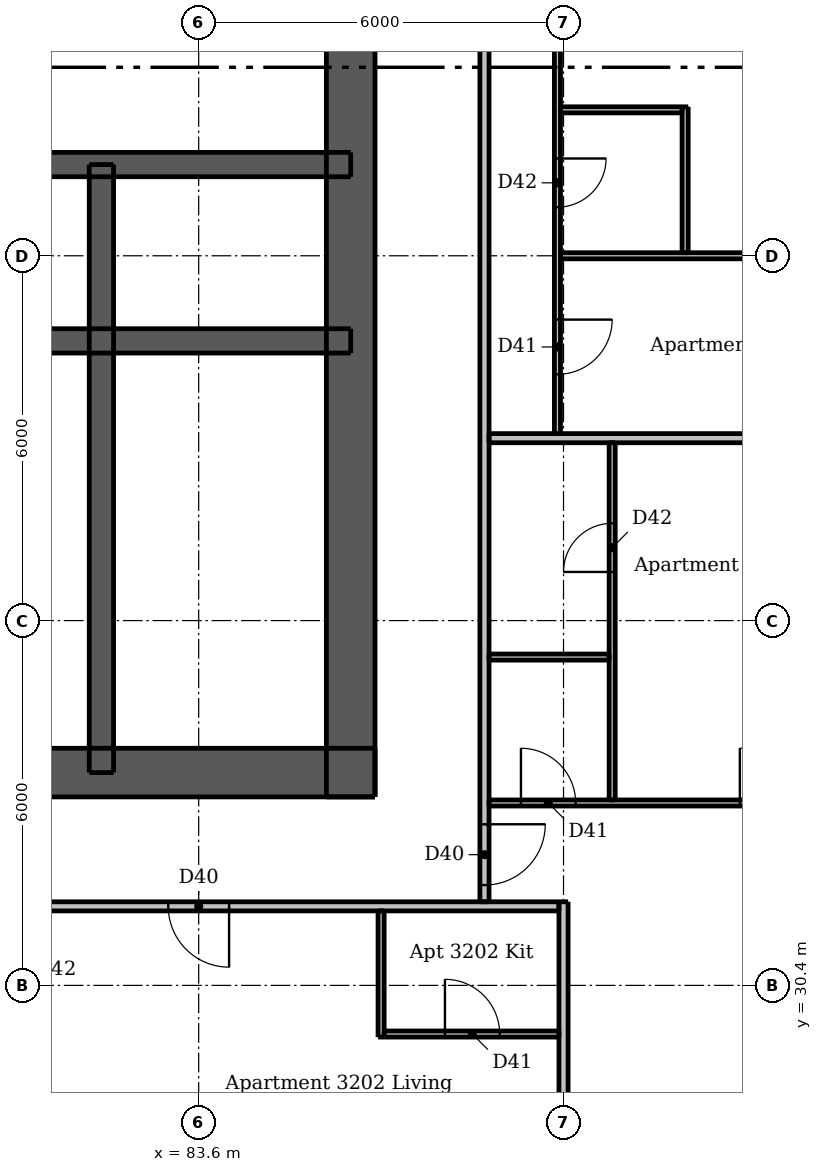
"""IFC4 building model, lengths in metres.
Left out: names, types, materials, properties, quantities, classifications, styles, units other than length and angle.
Written with IfcOpenShell. Run it as: python <this file> out.ifc"""

import sys

from ifc_helpers import new_model, si_unit, direction, frame, frame_2d, origin, place, context, subcontext, project, spatial, rectangle, extrude, element, fill, save


model = new_model("IFC4")
c1 = context("Model", 3, precision=1e-05, world=origin(), true_north=direction((0.0, 1.0)))
c2 = subcontext(c1, "Body", "Model", "MODEL_VIEW")
j1 = project(units=[si_unit("LENGTHUNIT", "METRE"), si_unit("PLANEANGLEUNIT", "RADIAN")], contexts=[c1])
p1 = place(None, origin())
s1 = spatial("IfcSite", under=j1, at=p1, CompositionType="ELEMENT")
p2 = place(p1, origin())
s2 = spatial("IfcBuilding", under=s1, at=p2, CompositionType="ELEMENT")
p3 = place(p2, frame((0.0, 0.0, 118.3)))
s3 = spatial("IfcBuildingStorey", under=s2, at=p3, CompositionType="ELEMENT", Elevation=118.3)
p4 = place(p3, frame((62.5, 33.9, 0.0), z_axis=(0.0, 0.0, 1.0), x_axis=(1.0, 0.0, 0.0)))
e1 = element("IfcWall", 1, at=p4, inside=s3, PredefinedType="SHEAR", context=c2, shape_type="SweptSolid", body=[
    extrude(rectangle(XDim=24.0, YDim=0.8, at=frame_2d((12.0, 0.0))), origin(), (0.0, 0.0, 1.0), 3.05),
])
p5 = place(p4, frame((2.0, 0.0, 0.0)))
e2 = element("IfcOpeningElement", 2, at=p5, cuts=e1, PredefinedType="OPENING", context=c2, shape_type="SweptSolid", body=[
    extrude(rectangle(XDim=1.1, YDim=2.1, at=frame_2d((0.55, 1.05))), frame((0.0, 0.41, 0.0), z_axis=(0.0, -1.0, 0.0), x_axis=(1.0, 0.0, 0.0)), (0.0, 0.0, 1.0), 0.82),
])
p6 = place(p4, frame((20.9, 0.0, 0.0)))
e3 = element("IfcOpeningElement", 3, at=p6, cuts=e1, PredefinedType="OPENING", context=c2, shape_type="SweptSolid", body=[
    extrude(rectangle(XDim=1.1, YDim=2.1, at=frame_2d((0.55, 1.05))), frame((0.0, 0.41, 0.0), z_axis=(0.0, -1.0, 0.0), x_axis=(1.0, 0.0, 0.0)), (0.0, 0.0, 1.0), 0.82),
])
p7 = place(p4, frame((8.0, 0.0, 0.0)))
e4 = element("IfcOpeningElement", 4, at=p7, cuts=e1, PredefinedType="OPENING", context=c2, shape_type="SweptSolid", body=[
    extrude(rectangle(XDim=1.1, YDim=2.1, at=frame_2d((0.55, 1.05))), frame((0.0, 0.41, 0.0), z_axis=(0.0, -1.0, 0.0), x_axis=(1.0, 0.0, 0.0)), (0.0, 0.0, 1.0), 0.82),
])
p8 = place(p4, frame((17.488, 0.0, 0.0)))
e5 = element("IfcOpeningElement", 5, at=p8, cuts=e1, PredefinedType="OPENING", context=c2, shape_type="SweptSolid", body=[
    extrude(rectangle(XDim=0.9, YDim=2.1, at=frame_2d((0.45, 1.05))), frame((0.0, 0.41, 0.0), z_axis=(0.0, -1.0, 0.0), x_axis=(1.0, 0.0, 0.0)), (0.0, 0.0, 1.0), 0.82),
])
p9 = place(p3, frame((86.1, 33.5, 0.0), z_axis=(0.0, 0.0, 1.0), x_axis=(0.0, 1.0, 0.0)))
e6 = element("IfcWall", 6, at=p9, inside=s3, PredefinedType="SHEAR", context=c2, shape_type="SweptSolid", body=[
    extrude(rectangle(XDim=24.0, YDim=0.8, at=frame_2d((12.0, 0.0))), origin(), (0.0, 0.0, 1.0), 3.05),
])
p10 = place(p9, frame((11.2, 0.0, 0.0)))
e7 = element("IfcOpeningElement", 7, at=p10, cuts=e6, PredefinedType="OPENING", context=c2, shape_type="SweptSolid", body=[
    extrude(rectangle(XDim=1.6, YDim=2.1, at=frame_2d((0.8, 1.05))), frame((0.0, 0.41, 0.0), z_axis=(0.0, -1.0, 0.0), x_axis=(1.0, 0.0, 0.0)), (0.0, 0.0, 1.0), 0.82),
])
p11 = place(p3, frame((62.9, 41.0, 0.0), z_axis=(0.0, 0.0, 1.0), x_axis=(1.0, 0.0, 0.0)))
e8 = element("IfcWall", 8, at=p11, inside=s3, PredefinedType="SHEAR", context=c2, shape_type="SweptSolid", body=[
    extrude(rectangle(XDim=23.2, YDim=0.4, at=frame_2d((11.6, 0.0))), origin(), (0.0, 0.0, 1.0), 3.05),
])
p12 = place(p3, frame((62.9, 43.9, 0.0), z_axis=(0.0, 0.0, 1.0), x_axis=(1.0, 0.0, 0.0)))
e9 = element("IfcWall", 9, at=p12, inside=s3, PredefinedType="SHEAR", context=c2, shape_type="SweptSolid", body=[
    extrude(rectangle(XDim=23.2, YDim=0.4, at=frame_2d((11.6, 0.0))), origin(), (0.0, 0.0, 1.0), 3.05),
])
p13 = place(p12, frame((1.7, 0.0, 0.0)))
e10 = element("IfcOpeningElement", 10, at=p13, cuts=e9, PredefinedType="OPENING", context=c2, shape_type="SweptSolid", body=[
    extrude(rectangle(XDim=0.9, YDim=2.1, at=frame_2d((0.45, 1.05))), frame((0.0, 0.21, 0.0), z_axis=(0.0, -1.0, 0.0), x_axis=(1.0, 0.0, 0.0)), (0.0, 0.0, 1.0), 0.42),
])
p14 = place(p12, frame((20.6, 0.0, 0.0)))
e11 = element("IfcOpeningElement", 11, at=p14, cuts=e9, PredefinedType="OPENING", context=c2, shape_type="SweptSolid", body=[
    extrude(rectangle(XDim=0.9, YDim=2.1, at=frame_2d((0.45, 1.05))), frame((0.0, 0.21, 0.0), z_axis=(0.0, -1.0, 0.0), x_axis=(1.0, 0.0, 0.0)), (0.0, 0.0, 1.0), 0.42),
])
p15 = place(p12, frame((4.8, 0.0, 0.0)))
e12 = element("IfcOpeningElement", 12, at=p15, cuts=e9, PredefinedType="OPENING", context=c2, shape_type="SweptSolid", body=[
    extrude(rectangle(XDim=1.1, YDim=2.1, at=frame_2d((0.55, 1.05))), frame((0.0, 0.21, 0.0), z_axis=(0.0, -1.0, 0.0), x_axis=(1.0, 0.0, 0.0)), (0.0, 0.0, 1.0), 0.42),
])
p16 = place(p12, frame((7.3, 0.0, 0.0)))
e13 = element("IfcOpeningElement", 13, at=p16, cuts=e9, PredefinedType="OPENING", context=c2, shape_type="SweptSolid", body=[
    extrude(rectangle(XDim=1.1, YDim=2.1, at=frame_2d((0.55, 1.05))), frame((0.0, 0.21, 0.0), z_axis=(0.0, -1.0, 0.0), x_axis=(1.0, 0.0, 0.0)), (0.0, 0.0, 1.0), 0.42),
])
p17 = place(p12, frame((9.8, 0.0, 0.0)))
e14 = element("IfcOpeningElement", 14, at=p17, cuts=e9, PredefinedType="OPENING", context=c2, shape_type="SweptSolid", body=[
    extrude(rectangle(XDim=1.1, YDim=2.1, at=frame_2d((0.55, 1.05))), frame((0.0, 0.21, 0.0), z_axis=(0.0, -1.0, 0.0), x_axis=(1.0, 0.0, 0.0)), (0.0, 0.0, 1.0), 0.42),
])
p18 = place(p12, frame((12.3, 0.0, 0.0)))
e15 = element("IfcOpeningElement", 15, at=p18, cuts=e9, PredefinedType="OPENING", context=c2, shape_type="SweptSolid", body=[
    extrude(rectangle(XDim=1.1, YDim=2.1, at=frame_2d((0.55, 1.05))), frame((0.0, 0.21, 0.0), z_axis=(0.0, -1.0, 0.0), x_axis=(1.0, 0.0, 0.0)), (0.0, 0.0, 1.0), 0.42),
])
p19 = place(p12, frame((14.8, 0.0, 0.0)))
e16 = element("IfcOpeningElement", 16, at=p19, cuts=e9, PredefinedType="OPENING", context=c2, shape_type="SweptSolid", body=[
    extrude(rectangle(XDim=1.1, YDim=2.1, at=frame_2d((0.55, 1.05))), frame((0.0, 0.21, 0.0), z_axis=(0.0, -1.0, 0.0), x_axis=(1.0, 0.0, 0.0)), (0.0, 0.0, 1.0), 0.42),
])
p20 = place(p12, frame((17.3, 0.0, 0.0)))
e17 = element("IfcOpeningElement", 17, at=p20, cuts=e9, PredefinedType="OPENING", context=c2, shape_type="SweptSolid", body=[
    extrude(rectangle(XDim=1.1, YDim=2.1, at=frame_2d((0.55, 1.05))), frame((0.0, 0.21, 0.0), z_axis=(0.0, -1.0, 0.0), x_axis=(1.0, 0.0, 0.0)), (0.0, 0.0, 1.0), 0.42),
])
p21 = place(p3, frame((82.0, 33.9, 0.0), z_axis=(0.0, 0.0, 1.0), x_axis=(0.0, 1.0, 0.0)))
e18 = element("IfcWall", 18, at=p21, inside=s3, PredefinedType="SHEAR", context=c2, shape_type="SweptSolid", body=[
    extrude(rectangle(XDim=10.0, YDim=0.4, at=frame_2d((5.0, 0.0))), origin(), (0.0, 0.0, 1.0), 3.05),
])
p22 = place(p3, frame((86.6, 29.55, 0.0), z_axis=(0.0, 0.0, 1.0), x_axis=(0.0, 1.0, 0.0)))
e19 = element("IfcWall", 19, at=p22, inside=s3, PredefinedType="PARTITIONING", context=c2, shape_type="SweptSolid", body=[
    extrude(rectangle(XDim=2.075, YDim=0.1, at=frame_2d((1.038, 0.0))), origin(), (0.0, 0.0, 1.0), 3.05),
])
p23 = place(p3, frame((89.5, 54.325, 0.0), z_axis=(0.0, 0.0, 1.0), x_axis=(0.0, -1.0, 0.0)))
e20 = element("IfcWall", 20, at=p23, inside=s3, PredefinedType="PARTITIONING", context=c2, shape_type="SweptSolid", body=[
    extrude(rectangle(XDim=14.85, YDim=0.1, at=frame_2d((7.425, 0.0))), origin(), (0.0, 0.0, 1.0), 3.05),
])
p24 = place(p23, frame((5.775, 0.0, 0.0)))
e21 = element("IfcOpeningElement", 21, at=p24, cuts=e20, PredefinedType="OPENING", context=c2, shape_type="SweptSolid", body=[
    extrude(rectangle(XDim=0.9, YDim=2.1, at=frame_2d((0.45, 1.05))), frame((0.0, 0.06, 0.0), z_axis=(0.0, -1.0, 0.0), x_axis=(1.0, 0.0, 0.0)), (0.0, 0.0, 1.0), 0.12),
])
p25 = place(p23, frame((0.975, 0.0, 0.0)))
e22 = element("IfcOpeningElement", 22, at=p25, cuts=e20, PredefinedType="OPENING", context=c2, shape_type="SweptSolid", body=[
    extrude(rectangle(XDim=0.9, YDim=2.1, at=frame_2d((0.45, 1.05))), frame((0.0, 0.06, 0.0), z_axis=(0.0, -1.0, 0.0), x_axis=(1.0, 0.0, 0.0)), (0.0, 0.0, 1.0), 0.12),
])
p26 = place(p23, frame((12.975, 0.0, 0.0)))
e23 = element("IfcOpeningElement", 23, at=p26, cuts=e20, PredefinedType="OPENING", context=c2, shape_type="SweptSolid", body=[
    extrude(rectangle(XDim=0.9, YDim=2.1, at=frame_2d((0.45, 1.05))), frame((0.0, 0.06, 0.0), z_axis=(0.0, -1.0, 0.0), x_axis=(1.0, 0.0, 0.0)), (0.0, 0.0, 1.0), 0.12),
])
p27 = place(p23, frame((10.325, 0.0, 0.0)))
e24 = element("IfcOpeningElement", 24, at=p27, cuts=e20, PredefinedType="OPENING", context=c2, shape_type="SweptSolid", body=[
    extrude(rectangle(XDim=0.8, YDim=2.1, at=frame_2d((0.4, 1.05))), frame((0.0, 0.06, 0.0), z_axis=(0.0, -1.0, 0.0), x_axis=(1.0, 0.0, 0.0)), (0.0, 0.0, 1.0), 0.12),
])
p28 = place(p3, frame((90.4, 33.45, 0.0), z_axis=(0.0, 0.0, 1.0), x_axis=(0.0, 1.0, 0.0)))
e25 = element("IfcWall", 25, at=p28, inside=s3, PredefinedType="PARTITIONING", context=c2, shape_type="SweptSolid", body=[
    extrude(rectangle(XDim=5.875, YDim=0.1, at=frame_2d((2.938, 0.0))), origin(), (0.0, 0.0, 1.0), 3.05),
])
p29 = place(p28, frame((3.75, 0.0, 0.0)))
e26 = element("IfcOpeningElement", 26, at=p29, cuts=e25, PredefinedType="OPENING", context=c2, shape_type="SweptSolid", body=[
    extrude(rectangle(XDim=0.8, YDim=2.1, at=frame_2d((0.4, 1.05))), frame((0.0, 0.06, 0.0), z_axis=(0.0, -1.0, 0.0), x_axis=(1.0, 0.0, 0.0)), (0.0, 0.0, 1.0), 0.12),
])
p30 = place(p3, frame((91.6, 42.45, 0.0), z_axis=(0.0, 0.0, 1.0), x_axis=(0.0, 1.0, 0.0)))
e27 = element("IfcWall", 27, at=p30, inside=s3, PredefinedType="PARTITIONING", context=c2, shape_type="SweptSolid", body=[
    extrude(rectangle(XDim=2.4, YDim=0.1, at=frame_2d((1.2, 0.0))), origin(), (0.0, 0.0, 1.0), 3.05),
])
p31 = place(p3, frame((89.55, 44.8, 0.0), z_axis=(0.0, 0.0, 1.0), x_axis=(1.0, 0.0, 0.0)))
e28 = element("IfcWall", 28, at=p31, inside=s3, PredefinedType="PARTITIONING", context=c2, shape_type="SweptSolid", body=[
    extrude(rectangle(XDim=2.0, YDim=0.1, at=frame_2d((1.0, 0.0))), origin(), (0.0, 0.0, 1.0), 3.05),
])
p32 = place(p3, frame((89.55, 42.4, 0.0), z_axis=(0.0, 0.0, 1.0), x_axis=(1.0, 0.0, 0.0)))
e29 = element("IfcWall", 29, at=p32, inside=s3, PredefinedType="PARTITIONING", context=c2, shape_type="SweptSolid", body=[
    extrude(rectangle(XDim=7.45, YDim=0.1, at=frame_2d((3.725, 0.0))), origin(), (0.0, 0.0, 1.0), 2.516),
])
p33 = place(p3, frame((88.375, 35.8, 0.0), z_axis=(0.0, 0.0, 1.0), x_axis=(1.0, 0.0, 0.0)))
e30 = element("IfcWall", 30, at=p33, inside=s3, PredefinedType="PARTITIONING", context=c2, shape_type="SweptSolid", body=[
    extrude(rectangle(XDim=1.975, YDim=0.1, at=frame_2d((0.988, 0.0))), origin(), (0.0, 0.0, 1.0), 3.05),
])
p34 = place(p3, frame((88.375, 33.4, 0.0), z_axis=(0.0, 0.0, 1.0), x_axis=(1.0, 0.0, 0.0)))
e31 = element("IfcWall", 31, at=p34, inside=s3, PredefinedType="PARTITIONING", context=c2, shape_type="SweptSolid", body=[
    extrude(rectangle(XDim=7.125, YDim=0.1, at=frame_2d((3.562, 0.0))), origin(), (0.0, 0.0, 1.0), 3.05),
])
p35 = place(p34, frame((0.525, 0.0, 0.0)))
e32 = element("IfcOpeningElement", 32, at=p35, cuts=e31, PredefinedType="OPENING", context=c2, shape_type="SweptSolid", body=[
    extrude(rectangle(XDim=0.9, YDim=2.1, at=frame_2d((0.45, 1.05))), frame((0.0, 0.06, 0.0), z_axis=(0.0, -1.0, 0.0), x_axis=(1.0, 0.0, 0.0)), (0.0, 0.0, 1.0), 0.12),
])
p36 = place(p34, frame((4.125, 0.0, 0.0)))
e33 = element("IfcOpeningElement", 33, at=p36, cuts=e31, PredefinedType="OPENING", context=c2, shape_type="SweptSolid", body=[
    extrude(rectangle(XDim=0.9, YDim=2.1, at=frame_2d((0.45, 1.05))), frame((0.0, 0.06, 0.0), z_axis=(0.0, -1.0, 0.0), x_axis=(1.0, 0.0, 0.0)), (0.0, 0.0, 1.0), 0.12),
])
p37 = place(p3, frame((86.65, 29.6, 0.0), z_axis=(0.0, 0.0, 1.0), x_axis=(1.0, 0.0, 0.0)))
e34 = element("IfcWall", 34, at=p37, inside=s3, PredefinedType="PARTITIONING", context=c2, shape_type="SweptSolid", body=[
    extrude(rectangle(XDim=2.875, YDim=0.1, at=frame_2d((1.438, 0.0))), origin(), (0.0, 0.0, 1.0), 3.05),
])
p38 = place(p37, frame((1.0, 0.0, 0.0)))
e35 = element("IfcOpeningElement", 35, at=p38, cuts=e34, PredefinedType="OPENING", context=c2, shape_type="SweptSolid", body=[
    extrude(rectangle(XDim=0.9, YDim=2.1, at=frame_2d((0.45, 1.05))), frame((0.0, 0.06, 0.0), z_axis=(0.0, -1.0, 0.0), x_axis=(1.0, 0.0, 0.0)), (0.0, 0.0, 1.0), 0.12),
])
p39 = place(p3, frame((88.3, 60.475, 0.0), z_axis=(0.0, 0.0, 1.0), x_axis=(0.0, -1.0, 0.0)))
e36 = element("IfcWall", 36, at=p39, inside=s3, PredefinedType="PARTITIONING", context=c2, shape_type="SweptSolid", body=[
    extrude(rectangle(XDim=28.7, YDim=0.15, at=frame_2d((14.35, 0.0))), origin(), (0.0, 0.0, 1.0), 3.05),
])
p40 = place(p39, frame((27.425, 0.0, 0.0)))
e37 = element("IfcOpeningElement", 37, at=p40, cuts=e36, PredefinedType="OPENING", context=c2, shape_type="SweptSolid", body=[
    extrude(rectangle(XDim=1.0, YDim=2.1, at=frame_2d((0.5, 1.05))), frame((0.0, 0.085, 0.0), z_axis=(0.0, -1.0, 0.0), x_axis=(1.0, 0.0, 0.0)), (0.0, 0.0, 1.0), 0.17),
])
p41 = place(p39, frame((13.075, 0.0, 0.0)))
e38 = element("IfcOpeningElement", 38, at=p41, cuts=e36, PredefinedType="OPENING", context=c2, shape_type="SweptSolid", body=[
    extrude(rectangle(XDim=1.0, YDim=2.1, at=frame_2d((0.5, 1.05))), frame((0.0, 0.085, 0.0), z_axis=(0.0, -1.0, 0.0), x_axis=(1.0, 0.0, 0.0)), (0.0, 0.0, 1.0), 0.17),
])
p42 = place(p39, frame((2.575, 0.0, 0.0)))
e39 = element("IfcOpeningElement", 39, at=p42, cuts=e36, PredefinedType="OPENING", context=c2, shape_type="SweptSolid", body=[
    extrude(rectangle(XDim=1.0, YDim=2.1, at=frame_2d((0.5, 1.05))), frame((0.0, 0.085, 0.0), z_axis=(0.0, -1.0, 0.0), x_axis=(1.0, 0.0, 0.0)), (0.0, 0.0, 1.0), 0.17),
])
p43 = place(p3, frame((89.6, 26.0, 0.0), z_axis=(0.0, 0.0, 1.0), x_axis=(0.0, 1.0, 0.0)))
e40 = element("IfcWall", 40, at=p43, inside=s3, PredefinedType="PARTITIONING", context=c2, shape_type="SweptSolid", body=[
    extrude(rectangle(XDim=5.775, YDim=0.15, at=frame_2d((2.887, 0.0))), origin(), (0.0, 0.0, 1.0), 2.516),
])
p44 = place(p3, frame((88.375, 39.4, 0.0), z_axis=(0.0, 0.0, 1.0), x_axis=(1.0, 0.0, 0.0)))
e41 = element("IfcWall", 41, at=p44, inside=s3, PredefinedType="PARTITIONING", context=c2, shape_type="SweptSolid", body=[
    extrude(rectangle(XDim=8.625, YDim=0.15, at=frame_2d((4.312, 0.0))), origin(), (0.0, 0.0, 1.0), 3.05),
])
p45 = place(p3, frame((89.525, 31.7, 0.0), z_axis=(0.0, 0.0, 1.0), x_axis=(-1.0, 0.0, 0.0)))
e42 = element("IfcWall", 42, at=p45, inside=s3, PredefinedType="PARTITIONING", context=c2, shape_type="SweptSolid", body=[
    extrude(rectangle(XDim=28.75, YDim=0.15, at=frame_2d((14.375, 0.0))), origin(), (0.0, 0.0, 1.0), 3.05),
])
p46 = place(p45, frame((24.625, 0.0, 0.0)))
e43 = element("IfcOpeningElement", 43, at=p46, cuts=e42, PredefinedType="OPENING", context=c2, shape_type="SweptSolid", body=[
    extrude(rectangle(XDim=1.0, YDim=2.1, at=frame_2d((0.5, 1.05))), frame((0.0, 0.085, 0.0), z_axis=(0.0, -1.0, 0.0), x_axis=(1.0, 0.0, 0.0)), (0.0, 0.0, 1.0), 0.17),
])
p47 = place(p45, frame((5.425, 0.0, 0.0)))
e44 = element("IfcOpeningElement", 44, at=p47, cuts=e42, PredefinedType="OPENING", context=c2, shape_type="SweptSolid", body=[
    extrude(rectangle(XDim=1.0, YDim=2.1, at=frame_2d((0.5, 1.05))), frame((0.0, 0.085, 0.0), z_axis=(0.0, -1.0, 0.0), x_axis=(1.0, 0.0, 0.0)), (0.0, 0.0, 1.0), 0.17),
])
p48 = place(p6, origin())
e45 = element("IfcDoor", 45, at=p48, inside=s3, OperationType="SINGLE_SWING_RIGHT", PredefinedType="DOOR", context=c2, shape_type="SweptSolid", body=[
    extrude(rectangle(XDim=1.1, YDim=2.1, at=frame_2d((0.55, 1.05))), frame((0.0, 0.388, 0.0), z_axis=(0.0, -1.0, 0.0), x_axis=(1.0, 0.0, 0.0)), (0.0, 0.0, 1.0), 0.05),
])
fill(e3, e45)
p49 = place(p10, origin())
e46 = element("IfcDoor", 46, at=p49, inside=s3, OperationType="DOUBLE_DOOR_SINGLE_SWING", PredefinedType="DOOR", context=c2, shape_type="SweptSolid", body=[
    extrude(rectangle(XDim=1.6, YDim=2.1, at=frame_2d((0.8, 1.05))), frame((0.0, 0.388, 0.0), z_axis=(0.0, -1.0, 0.0), x_axis=(1.0, 0.0, 0.0)), (0.0, 0.0, 1.0), 0.05),
])
fill(e7, e46)
p50 = place(p14, origin())
e47 = element("IfcDoor", 47, at=p50, inside=s3, OperationType="SINGLE_SWING_LEFT", PredefinedType="DOOR", context=c2, shape_type="SweptSolid", body=[
    extrude(rectangle(XDim=0.9, YDim=2.1, at=frame_2d((0.45, 1.05))), frame((0.0, -0.138, 0.0), z_axis=(0.0, -1.0, 0.0), x_axis=(1.0, 0.0, 0.0)), (0.0, 0.0, 1.0), 0.05),
])
fill(e11, e47)
p51 = place(p20, origin())
e48 = element("IfcDoor", 48, at=p51, inside=s3, OperationType="DOUBLE_DOOR_SLIDING", PredefinedType="DOOR", context=c2, shape_type="SweptSolid", body=[
    extrude(rectangle(XDim=1.1, YDim=2.1, at=frame_2d((0.55, 1.05))), frame((0.0, 0.025, 0.0), z_axis=(0.0, -1.0, 0.0), x_axis=(1.0, 0.0, 0.0)), (0.0, 0.0, 1.0), 0.05),
])
fill(e17, e48)
p52 = place(p47, origin())
e49 = element("IfcDoor", 49, at=p52, inside=s3, OperationType="SINGLE_SWING_LEFT", PredefinedType="DOOR", context=c2, shape_type="SweptSolid", body=[
    extrude(rectangle(XDim=1.0, YDim=2.1, at=frame_2d((0.5, 1.05))), frame((0.0, 0.025, 0.0), z_axis=(0.0, -1.0, 0.0), x_axis=(1.0, 0.0, 0.0)), (0.0, 0.0, 1.0), 0.05),
])
fill(e44, e49)
p53 = place(p38, origin())
e50 = element("IfcDoor", 50, at=p53, inside=s3, OperationType="SINGLE_SWING_LEFT", PredefinedType="DOOR", context=c2, shape_type="SweptSolid", body=[
    extrude(rectangle(XDim=0.9, YDim=2.1, at=frame_2d((0.45, 1.05))), frame((0.0, 0.025, 0.0), z_axis=(0.0, -1.0, 0.0), x_axis=(1.0, 0.0, 0.0)), (0.0, 0.0, 1.0), 0.05),
])
fill(e35, e50)
p54 = place(p40, origin())
e51 = element("IfcDoor", 51, at=p54, inside=s3, OperationType="SINGLE_SWING_LEFT", PredefinedType="DOOR", context=c2, shape_type="SweptSolid", body=[
    extrude(rectangle(XDim=1.0, YDim=2.1, at=frame_2d((0.5, 1.05))), frame((0.0, 0.025, 0.0), z_axis=(0.0, -1.0, 0.0), x_axis=(1.0, 0.0, 0.0)), (0.0, 0.0, 1.0), 0.05),
])
fill(e37, e51)
p55 = place(p35, origin())
e52 = element("IfcDoor", 52, at=p55, inside=s3, OperationType="SINGLE_SWING_LEFT", PredefinedType="DOOR", context=c2, shape_type="SweptSolid", body=[
    extrude(rectangle(XDim=0.9, YDim=2.1, at=frame_2d((0.45, 1.05))), frame((0.0, 0.025, 0.0), z_axis=(0.0, -1.0, 0.0), x_axis=(1.0, 0.0, 0.0)), (0.0, 0.0, 1.0), 0.05),
])
fill(e32, e52)
p56 = place(p36, origin())
e53 = element("IfcDoor", 53, at=p56, inside=s3, OperationType="SINGLE_SWING_LEFT", PredefinedType="DOOR", context=c2, shape_type="SweptSolid", body=[
    extrude(rectangle(XDim=0.9, YDim=2.1, at=frame_2d((0.45, 1.05))), frame((0.0, 0.025, 0.0), z_axis=(0.0, -1.0, 0.0), x_axis=(1.0, 0.0, 0.0)), (0.0, 0.0, 1.0), 0.05),
])
fill(e33, e53)
p57 = place(p29, origin())
e54 = element("IfcDoor", 54, at=p57, inside=s3, OperationType="SINGLE_SWING_LEFT", PredefinedType="DOOR", context=c2, shape_type="SweptSolid", body=[
    extrude(rectangle(XDim=0.8, YDim=2.1, at=frame_2d((0.4, 1.05))), frame((0.0, 0.025, 0.0), z_axis=(0.0, -1.0, 0.0), x_axis=(1.0, 0.0, 0.0)), (0.0, 0.0, 1.0), 0.05),
])
fill(e26, e54)
p58 = place(p26, origin())
e55 = element("IfcDoor", 55, at=p58, inside=s3, OperationType="SINGLE_SWING_LEFT", PredefinedType="DOOR", context=c2, shape_type="SweptSolid", body=[
    extrude(rectangle(XDim=0.9, YDim=2.1, at=frame_2d((0.45, 1.05))), frame((0.0, 0.025, 0.0), z_axis=(0.0, -1.0, 0.0), x_axis=(1.0, 0.0, 0.0)), (0.0, 0.0, 1.0), 0.05),
])
fill(e23, e55)
p59 = place(p27, origin())
e56 = element("IfcDoor", 56, at=p59, inside=s3, OperationType="SINGLE_SWING_LEFT", PredefinedType="DOOR", context=c2, shape_type="SweptSolid", body=[
    extrude(rectangle(XDim=0.8, YDim=2.1, at=frame_2d((0.4, 1.05))), frame((0.0, 0.025, 0.0), z_axis=(0.0, -1.0, 0.0), x_axis=(1.0, 0.0, 0.0)), (0.0, 0.0, 1.0), 0.05),
])
fill(e24, e56)
save(model, sys.argv[1])
